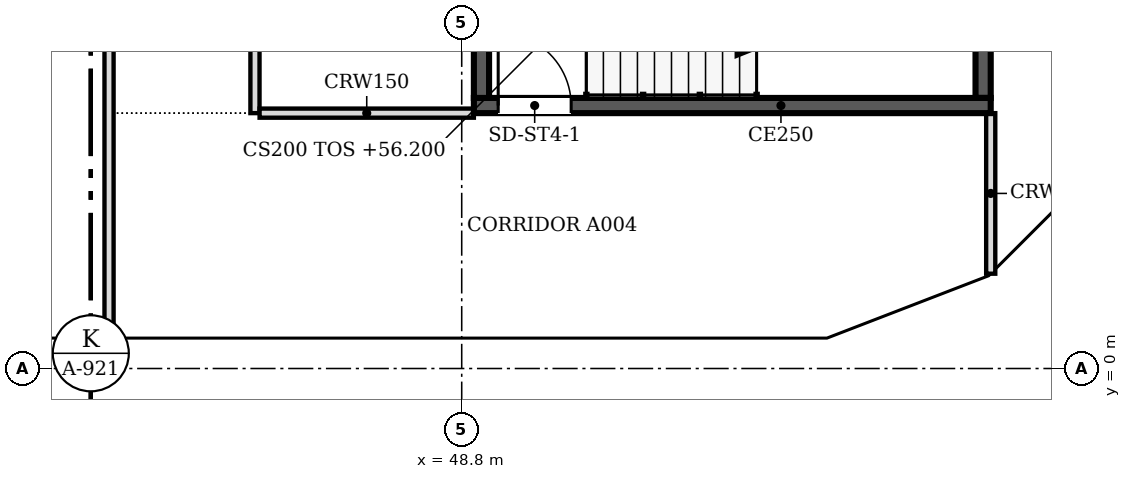
"""IFC4 building model, lengths in metres.
Left out: names, types, materials, properties, quantities, classifications, styles, units other than length and angle.
Written with IfcOpenShell. Run it as: python <this file> out.ifc"""

import sys

from ifc_helpers import new_model, si_unit, direction, frame, frame_2d, origin, place, context, subcontext, project, spatial, polyline, rectangle, outline, extrude, faceted_brep, source, transform, mapped, element, fill, save


model = new_model("IFC4")
c1 = context("Model", 3, precision=1e-05, world=origin(), true_north=direction((0.0, 1.0)))
c2 = subcontext(c1, "Body", "Model", "MODEL_VIEW")
j1 = project(units=[si_unit("LENGTHUNIT", "METRE"), si_unit("PLANEANGLEUNIT", "RADIAN")], contexts=[c1])
p1 = place(None, origin())
s1 = spatial("IfcSite", under=j1, at=p1, CompositionType="ELEMENT")
p2 = place(p1, origin())
s2 = spatial("IfcBuilding", under=s1, at=p2, CompositionType="ELEMENT")
p3 = place(p2, frame((0.0, 0.0, 56.2)))
s3 = spatial("IfcBuildingStorey", under=s2, at=p3, CompositionType="ELEMENT", Elevation=56.2)
m1 = source(origin(), c2, "Body", "SweptSolid", [
    extrude(outline(polyline([(3.05, 0.0), (6.1, 3.8), (3.05, 7.6), (0.0, 3.8), (3.05, 0.0)])), frame((0.0, 0.25, 0.0), z_axis=(0.0, -1.0, 0.0), x_axis=(1.0, 0.0, 0.0)), (0.0, 0.0, 1.0), 0.5),
])
p4 = place(p3, frame((39.65, 0.25, -3.8), z_axis=(0.0, 0.0, 1.0), x_axis=(1.0, 0.0, 0.0)))
e1 = element("IfcWall", 1, at=p4, inside=s3, PredefinedType="SOLIDWALL", context=c2, shape_type="MappedRepresentation", body=[
    mapped(m1, transform((0.0, 0.0, 0.0), scale=1.0)),
])
m2 = source(origin(), c2, "Body", "SweptSolid", [
    extrude(outline(polyline([(3.05, 0.399), (5.78, 3.8), (3.05, 7.201), (0.321, 3.8), (3.05, 0.399)])), frame((0.0, 0.26, 0.0), z_axis=(0.0, -1.0, 0.0), x_axis=(1.0, 0.0, 0.0)), (0.0, 0.0, 1.0), 0.52),
])
p5 = place(p4, origin())
e2 = element("IfcOpeningElement", 2, at=p5, cuts=e1, PredefinedType="OPENING", context=c2, shape_type="MappedRepresentation", body=[
    mapped(m2, transform((0.0, 0.0, 0.0), scale=1.0)),
])
p6 = place(p3, frame((45.75, 0.25, -3.8), z_axis=(0.0, 0.0, 1.0), x_axis=(1.0, 0.0, 0.0)))
e3 = element("IfcWall", 3, at=p6, inside=s3, PredefinedType="SOLIDWALL", context=c2, shape_type="MappedRepresentation", body=[
    mapped(m1, transform((0.0, 0.0, 0.0), scale=1.0)),
])
p7 = place(p6, origin())
e4 = element("IfcOpeningElement", 4, at=p7, cuts=e3, PredefinedType="OPENING", context=c2, shape_type="MappedRepresentation", body=[
    mapped(m2, transform((0.0, 0.0, 0.0), scale=1.0)),
])
m3 = source(origin(), c2, "Body", "Brep", [
    faceted_brep([(3.003, -0.25, 0.0), (3.05, -0.25, 0.06), (3.05, -0.25, 7.54), (3.003, -0.25, 7.6), (0.0, -0.25, 3.8), (0.0, 0.25, 3.8), (2.957, 0.25, 7.541), (2.957, 0.25, 0.059), (3.003, 0.0, 0.0), (3.003, 0.0, 7.6)], [[[0, 1, 2, 3, 4]], [[5, 6, 7]], [[1, 0, 8]], [[9, 3, 2]], [[6, 5, 4, 3, 9]], [[5, 7, 8, 0, 4]], [[1, 8, 7, 6, 9, 2]]]),
])
p8 = place(p3, frame((51.85, 0.25, -3.8), z_axis=(0.0, 0.0, 1.0), x_axis=(1.0, 0.0, 0.0)))
e5 = element("IfcWall", 5, at=p8, inside=s3, PredefinedType="SOLIDWALL", context=c2, shape_type="MappedRepresentation", body=[
    mapped(m3, transform((0.0, 0.0, 0.0), scale=1.0)),
])
m4 = source(origin(), c2, "Body", "SweptSolid", [
    extrude(outline(polyline([(2.803, 6.944), (0.319, 3.8), (2.803, 0.656), (2.803, 6.944)])), frame((0.0, 0.26, 0.0), z_axis=(0.0, -1.0, 0.0), x_axis=(1.0, 0.0, 0.0)), (0.0, 0.0, 1.0), 0.52),
])
p9 = place(p8, origin())
e6 = element("IfcOpeningElement", 6, at=p9, cuts=e5, PredefinedType="OPENING", context=c2, shape_type="MappedRepresentation", body=[
    mapped(m4, transform((0.0, 0.0, 0.0), scale=1.0)),
])
m5 = source(origin(), c2, "Body", "Brep", [
    faceted_brep([(0.047, -0.25, 0.0), (2.997, -0.25, 3.8), (0.047, -0.25, 7.6), (0.0, -0.25, 7.541), (0.0, -0.25, 0.059), (0.093, 0.25, 7.54), (2.944, 0.25, 3.868), (2.944, 0.25, 3.732), (0.093, 0.25, 0.06), (2.997, 0.0, 3.8), (0.047, 0.0, 0.0), (0.047, 0.0, 7.6)], [[[0, 1, 2, 3, 4]], [[5, 6, 7, 8]], [[8, 7, 9, 1, 0, 10]], [[6, 5, 11, 2, 1, 9]], [[3, 2, 11]], [[10, 0, 4]], [[8, 10, 4, 3, 11, 5]], [[9, 7, 6]]]),
])
p10 = place(p3, frame((54.81, 0.233, -3.8), z_axis=(0.0, 0.0, 1.0), x_axis=(0.932990326376, 0.359901446078, 0.0)))
e7 = element("IfcWall", 7, at=p10, inside=s3, PredefinedType="SOLIDWALL", context=c2, shape_type="MappedRepresentation", body=[
    mapped(m5, transform((0.0, 0.0, 0.0), scale=1.0)),
])
m6 = source(origin(), c2, "Body", "SweptSolid", [
    extrude(outline(polyline([(0.247, 0.665), (2.681, 3.8), (0.247, 6.935), (0.247, 0.665)])), frame((0.0, 0.26, 0.0), z_axis=(0.0, -1.0, 0.0), x_axis=(1.0, 0.0, 0.0)), (0.0, 0.0, 1.0), 0.52),
])
p11 = place(p10, origin())
e8 = element("IfcOpeningElement", 8, at=p11, cuts=e7, PredefinedType="OPENING", context=c2, shape_type="MappedRepresentation", body=[
    mapped(m6, transform((0.0, 0.0, 0.0), scale=1.0)),
])
m7 = source(origin(), c2, "Body", "Brep", [
    faceted_brep([(2.944, -0.25, 0.0), (2.997, -0.25, 0.068), (2.997, -0.25, 7.532), (2.944, -0.25, 7.6), (0.0, -0.25, 3.8), (0.053, 0.25, 3.868), (2.891, 0.25, 7.532), (2.891, 0.25, 0.068), (0.053, 0.25, 3.732), (2.944, 0.0, 0.0), (2.944, 0.0, 7.6), (0.0, 0.0, 3.8)], [[[0, 1, 2, 3, 4]], [[5, 6, 7, 8]], [[1, 0, 9]], [[10, 3, 2]], [[6, 5, 11, 4, 3, 10]], [[8, 7, 9, 0, 4, 11]], [[8, 11, 5]], [[1, 9, 7, 6, 10, 2]]]),
])
p12 = place(p3, frame((57.606, 1.312, -3.8), z_axis=(0.0, 0.0, 1.0), x_axis=(0.707147509625, 0.707066050402, 0.0)))
e9 = element("IfcWall", 9, at=p12, inside=s3, PredefinedType="SOLIDWALL", context=c2, shape_type="MappedRepresentation", body=[
    mapped(m7, transform((0.0, 0.0, 0.0), scale=1.0)),
])
m8 = source(origin(), c2, "Body", "SweptSolid", [
    extrude(outline(polyline([(2.744, 6.934), (0.316, 3.8), (2.744, 0.667), (2.744, 6.934)])), frame((0.0, 0.26, 0.0), z_axis=(0.0, -1.0, 0.0), x_axis=(1.0, 0.0, 0.0)), (0.0, 0.0, 1.0), 0.52),
])
p13 = place(p12, origin())
e10 = element("IfcOpeningElement", 10, at=p13, cuts=e9, PredefinedType="OPENING", context=c2, shape_type="MappedRepresentation", body=[
    mapped(m8, transform((0.0, 0.0, 0.0), scale=1.0)),
])
p14 = place(p2, frame((0.0, 0.0, 60.0)))
s4 = spatial("IfcBuildingStorey", under=s2, at=p14, CompositionType="ELEMENT", Elevation=60.0)
m9 = source(origin(), c2, "Body", "Brep", [
    faceted_brep([(3.05, -0.25, 0.0), (6.1, -0.25, 3.8), (6.1, -0.25, 3.8), (3.05, -0.25, 7.6), (0.0, -0.25, 3.8), (0.0, 0.25, 3.8), (3.05, 0.25, 7.6), (6.1, 0.25, 3.8), (6.1, 0.25, 3.8), (3.05, 0.25, 0.0)], [[[0, 1, 2, 3, 4]], [[5, 6, 7, 8, 9]], [[9, 8, 1, 0]], [[7, 6, 3, 2]], [[6, 5, 4, 3]], [[5, 9, 0, 4]], [[1, 8, 7, 2]]]),
])
p15 = place(p14, frame((36.6, 0.25, -3.8), z_axis=(0.0, 0.0, 1.0), x_axis=(1.0, 0.0, 0.0)))
e11 = element("IfcWall", 11, at=p15, inside=s4, PredefinedType="SOLIDWALL", context=c2, shape_type="MappedRepresentation", body=[
    mapped(m9, transform((0.0, 0.0, 0.0), scale=1.0)),
])
p16 = place(p15, origin())
e12 = element("IfcOpeningElement", 12, at=p16, cuts=e11, PredefinedType="OPENING", context=c2, shape_type="MappedRepresentation", body=[
    mapped(m2, transform((0.0, 0.0, 0.0), scale=1.0)),
])
p17 = place(p14, frame((42.7, 0.25, -3.8), z_axis=(0.0, 0.0, 1.0), x_axis=(1.0, 0.0, 0.0)))
e13 = element("IfcWall", 13, at=p17, inside=s4, PredefinedType="SOLIDWALL", context=c2, shape_type="MappedRepresentation", body=[
    mapped(m1, transform((0.0, 0.0, 0.0), scale=1.0)),
])
p18 = place(p17, origin())
e14 = element("IfcOpeningElement", 14, at=p18, cuts=e13, PredefinedType="OPENING", context=c2, shape_type="MappedRepresentation", body=[
    mapped(m2, transform((0.0, 0.0, 0.0), scale=1.0)),
])
m10 = source(origin(), c2, "Body", "Brep", [
    faceted_brep([(3.05, -0.25, 0.0), (6.053, -0.25, 3.8), (3.05, -0.25, 7.6), (0.0, -0.25, 3.8), (0.0, 0.25, 3.8), (3.05, 0.25, 7.6), (6.007, 0.25, 3.859), (6.007, 0.25, 3.741), (3.05, 0.25, 0.0), (6.053, 0.0, 3.8)], [[[0, 1, 2, 3]], [[4, 5, 6, 7, 8]], [[8, 7, 9, 1, 0]], [[6, 5, 2, 1, 9]], [[5, 4, 3, 2]], [[4, 8, 0, 3]], [[9, 7, 6]]]),
])
p19 = place(p14, frame((48.8, 0.25, -3.8), z_axis=(0.0, 0.0, 1.0), x_axis=(1.0, 0.0, 0.0)))
e15 = element("IfcWall", 15, at=p19, inside=s4, PredefinedType="SOLIDWALL", context=c2, shape_type="MappedRepresentation", body=[
    mapped(m10, transform((0.0, 0.0, 0.0), scale=1.0)),
])
m11 = source(origin(), c2, "Body", "SweptSolid", [
    extrude(outline(polyline([(3.049, 0.401), (5.735, 3.8), (3.049, 7.199), (0.321, 3.8), (3.049, 0.401)])), frame((0.0, 0.26, 0.0), z_axis=(0.0, -1.0, 0.0), x_axis=(1.0, 0.0, 0.0)), (0.0, 0.0, 1.0), 0.52),
])
p20 = place(p19, origin())
e16 = element("IfcOpeningElement", 16, at=p20, cuts=e15, PredefinedType="OPENING", context=c2, shape_type="MappedRepresentation", body=[
    mapped(m11, transform((0.0, 0.0, 0.0), scale=1.0)),
])
m12 = source(origin(), c2, "Body", "Brep", [
    faceted_brep([(2.95, -0.25, 0.0), (3.003, -0.25, 0.068), (3.003, -0.25, 7.532), (2.95, -0.25, 7.6), (0.0, -0.25, 3.8), (0.047, 0.25, 3.86), (2.898, 0.25, 7.532), (2.898, 0.25, 0.068), (0.047, 0.25, 3.74), (2.95, 0.0, 0.0), (2.95, 0.0, 7.6), (0.0, 0.0, 3.8)], [[[0, 1, 2, 3, 4]], [[5, 6, 7, 8]], [[1, 0, 9]], [[10, 3, 2]], [[6, 5, 11, 4, 3, 10]], [[8, 7, 9, 0, 4, 11]], [[8, 11, 5]], [[1, 9, 7, 6, 10, 2]]]),
])
p21 = place(p14, frame((54.854, 0.25, -3.8), z_axis=(0.0, 0.0, 1.0), x_axis=(0.932970071518, 0.359953949349, 0.0)))
e17 = element("IfcWall", 17, at=p21, inside=s4, PredefinedType="SOLIDWALL", context=c2, shape_type="MappedRepresentation", body=[
    mapped(m12, transform((0.0, 0.0, 0.0), scale=1.0)),
])
m13 = source(origin(), c2, "Body", "SweptSolid", [
    extrude(outline(polyline([(2.75, 6.935), (0.316, 3.8), (2.75, 0.665), (2.75, 6.935)])), frame((0.0, 0.26, 0.0), z_axis=(0.0, -1.0, 0.0), x_axis=(1.0, 0.0, 0.0)), (0.0, 0.0, 1.0), 0.52),
])
p22 = place(p21, origin())
e18 = element("IfcOpeningElement", 18, at=p22, cuts=e17, PredefinedType="OPENING", context=c2, shape_type="MappedRepresentation", body=[
    mapped(m13, transform((0.0, 0.0, 0.0), scale=1.0)),
])
m14 = source(origin(), c2, "Body", "Brep", [
    faceted_brep([(0.053, -0.25, 0.0), (2.997, -0.25, 3.8), (0.053, -0.25, 7.6), (0.0, -0.25, 7.532), (0.0, -0.25, 0.068), (0.106, 0.25, 7.532), (2.944, 0.25, 3.868), (2.944, 0.25, 3.732), (0.106, 0.25, 0.068), (2.997, 0.0, 3.8), (0.053, 0.0, 0.0), (0.053, 0.0, 7.6)], [[[0, 1, 2, 3, 4]], [[5, 6, 7, 8]], [[8, 7, 9, 1, 0, 10]], [[6, 5, 11, 2, 1, 9]], [[3, 2, 11]], [[10, 0, 4]], [[8, 10, 4, 3, 11, 5]], [[9, 7, 6]]]),
])
p23 = place(p14, frame((57.569, 1.274, -3.8), z_axis=(0.0, 0.0, 1.0), x_axis=(0.707066050402, 0.707147509625, 0.0)))
e19 = element("IfcWall", 19, at=p23, inside=s4, PredefinedType="SOLIDWALL", context=c2, shape_type="MappedRepresentation", body=[
    mapped(m14, transform((0.0, 0.0, 0.0), scale=1.0)),
])
m15 = source(origin(), c2, "Body", "SweptSolid", [
    extrude(outline(polyline([(0.253, 0.666), (2.681, 3.8), (0.253, 6.934), (0.253, 0.666)])), frame((0.0, 0.26, 0.0), z_axis=(0.0, -1.0, 0.0), x_axis=(1.0, 0.0, 0.0)), (0.0, 0.0, 1.0), 0.52),
])
p24 = place(p23, origin())
e20 = element("IfcOpeningElement", 20, at=p24, cuts=e19, PredefinedType="OPENING", context=c2, shape_type="MappedRepresentation", body=[
    mapped(m15, transform((0.0, 0.0, 0.0), scale=1.0)),
])
p25 = place(p3, frame((57.5, 4.325, 0.0), z_axis=(0.0, 0.0, 1.0), x_axis=(-1.0, 0.0, 0.0)))
e21 = element("IfcWall", 21, at=p25, inside=s3, PredefinedType="SOLIDWALL", context=c2, shape_type="SweptSolid", body=[
    extrude(rectangle(XDim=8.5, YDim=0.25, at=frame_2d((4.25, 0.0))), origin(), (0.0, 0.0, 1.0), 3.8),
])
m16 = source(origin(), c2, "Body", "SweptSolid", [
    extrude(rectangle(XDim=1.2, YDim=2.1, at=frame_2d((0.6, 1.05))), frame((0.0, 0.135, 0.0), z_axis=(0.0, -1.0, 0.0), x_axis=(1.0, 0.0, 0.0)), (0.0, 0.0, 1.0), 0.27),
])
p26 = place(p25, frame((6.9, 0.0, 0.0)))
e22 = element("IfcOpeningElement", 22, at=p26, cuts=e21, PredefinedType="OPENING", context=c2, shape_type="MappedRepresentation", body=[
    mapped(m16, transform((0.0, 0.0, 0.0), scale=1.0)),
])
for number, where, z_axis, x_axis in (
    (23, (49.125, 4.45, 0.0), (0.0, 0.0, 1.0), (0.0, 1.0, 0.0)),
    (24, (57.375, 7.85, 0.0), (0.0, 0.0, 1.0), (0.0, -1.0, 0.0)),
):
    element("IfcWall", number, at=place(p3, frame(where, z_axis=z_axis, x_axis=x_axis)), inside=s3, PredefinedType="SOLIDWALL", context=c2, shape_type="SweptSolid", body=[
        extrude(rectangle(XDim=3.4, YDim=0.25, at=frame_2d((1.7, 0.0))), origin(), (0.0, 0.0, 1.0), 3.8),
    ])
p27 = place(p3, frame((43.0, 0.5, 0.0), z_axis=(0.0, 0.0, 1.0), x_axis=(0.0, 1.0, 0.0)))
e25 = element("IfcWall", 25, at=p27, inside=s3, PredefinedType="PARTITIONING", context=c2, shape_type="SweptSolid", body=[
    extrude(rectangle(XDim=21.424, YDim=0.15, at=frame_2d((10.712, 0.0))), origin(), (0.0, 0.0, 1.0), 3.067),
])
m17 = source(origin(), c2, "Body", "SweptSolid", [
    extrude(rectangle(XDim=1.0, YDim=2.1, at=frame_2d((0.5, 1.05))), frame((0.0, 0.085, 0.0), z_axis=(0.0, -1.0, 0.0), x_axis=(1.0, 0.0, 0.0)), (0.0, 0.0, 1.0), 0.17),
])
p28 = place(p27, frame((16.601, 0.0, 0.0)))
e26 = element("IfcOpeningElement", 26, at=p28, cuts=e25, PredefinedType="OPENING", context=c2, shape_type="MappedRepresentation", body=[
    mapped(m17, transform((0.0, 0.0, 0.0), scale=1.0)),
])
p29 = place(p27, frame((7.7, 0.0, 0.0)))
e27 = element("IfcOpeningElement", 27, at=p29, cuts=e25, PredefinedType="OPENING", context=c2, shape_type="MappedRepresentation", body=[
    mapped(m17, transform((0.0, 0.0, 0.0), scale=1.0)),
])
p30 = place(p3, frame((57.5, 1.559, 0.0), z_axis=(0.0, 0.0, 1.0), x_axis=(0.0, 1.0, 0.0)))
e28 = element("IfcWall", 28, at=p30, inside=s3, PredefinedType="PARTITIONING", context=c2, shape_type="SweptSolid", body=[
    extrude(rectangle(XDim=2.641, YDim=0.15, at=frame_2d((1.32, 0.0))), origin(), (0.0, 0.0, 1.0), 3.067),
])
p31 = place(p3, frame((45.4, 22.0, 0.0), z_axis=(0.0, 0.0, 1.0), x_axis=(0.0, -1.0, 0.0)))
e29 = element("IfcWall", 29, at=p31, inside=s3, PredefinedType="PARTITIONING", context=c2, shape_type="SweptSolid", body=[
    extrude(rectangle(XDim=17.8, YDim=0.15, at=frame_2d((8.9, 0.0))), origin(), (0.0, 0.0, 1.0), 3.067),
])
p32 = place(p31, frame((3.499, 0.0, 0.0)))
e30 = element("IfcOpeningElement", 30, at=p32, cuts=e29, PredefinedType="OPENING", context=c2, shape_type="MappedRepresentation", body=[
    mapped(m17, transform((0.0, 0.0, 0.0), scale=1.0)),
])
m18 = source(origin(), c2, "Body", "SweptSolid", [
    extrude(rectangle(XDim=0.9, YDim=2.1, at=frame_2d((0.45, 1.05))), frame((0.0, 0.085, 0.0), z_axis=(0.0, -1.0, 0.0), x_axis=(1.0, 0.0, 0.0)), (0.0, 0.0, 1.0), 0.17),
])
p33 = place(p31, frame((12.4, 0.0, 0.0)))
e31 = element("IfcOpeningElement", 31, at=p33, cuts=e29, PredefinedType="OPENING", context=c2, shape_type="MappedRepresentation", body=[
    mapped(m18, transform((0.0, 0.0, 0.0), scale=1.0)),
])
p34 = place(p3, frame((45.476, 4.2, 0.0), z_axis=(0.0, 0.0, 1.0), x_axis=(1.0, 0.0, 0.0)))
e32 = element("IfcWall", 32, at=p34, inside=s3, PredefinedType="PARTITIONING", context=c2, shape_type="SweptSolid", body=[
    extrude(rectangle(XDim=3.524, YDim=0.15, at=frame_2d((1.762, 0.0))), origin(), (0.0, 0.0, 1.0), 3.067),
])
m19 = source(origin(), c2, "Body", "SweptSolid", [
    extrude(rectangle(XDim=1.2, YDim=2.1, at=frame_2d((0.6, 1.05))), frame((0.0, 0.025, 0.0), z_axis=(0.0, -1.0, 0.0), x_axis=(1.0, 0.0, 0.0)), (0.0, 0.0, 1.0), 0.05),
])
p35 = place(p26, origin())
e33 = element("IfcDoor", 33, at=p35, inside=s3, OperationType="SINGLE_SWING_RIGHT", PredefinedType="DOOR", context=c2, shape_type="MappedRepresentation", body=[
    mapped(m19, transform((0.0, 0.0, 0.0), scale=1.0)),
])
fill(e22, e33)
save(model, sys.argv[1])
